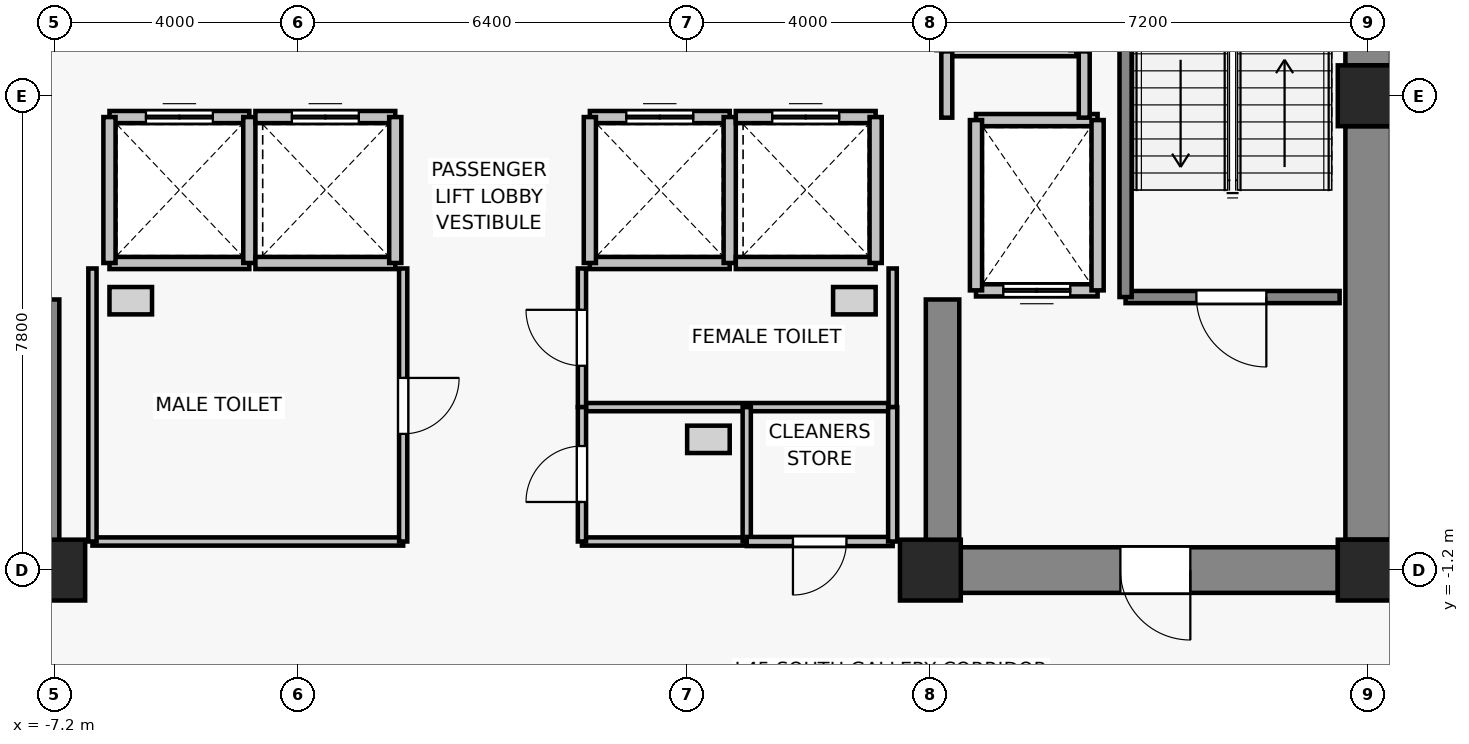
"""IFC4 building model, lengths in metres.
Left out: names, types, materials, properties, quantities, classifications, styles, units other than length and angle.
Written with IfcOpenShell. Run it as: python <this file> out.ifc"""

import sys

from ifc_helpers import new_model, si_unit, direction, frame, frame_2d, origin, origin_2d, place, context, subcontext, project, spatial, rectangle, extrude, source, transform, mapped, element, fill, save


model = new_model("IFC4")
c1 = context("Model", 3, precision=1e-05, world=origin(), true_north=direction((0.0, 1.0)))
c2 = subcontext(c1, "Body", "Model", "MODEL_VIEW")
j1 = project(units=[si_unit("LENGTHUNIT", "METRE"), si_unit("PLANEANGLEUNIT", "RADIAN")], contexts=[c1])
p1 = place(None, origin())
s1 = spatial("IfcSite", under=j1, at=p1, CompositionType="ELEMENT")
p2 = place(p1, origin())
s2 = spatial("IfcBuilding", under=s1, at=p2, CompositionType="ELEMENT")
p3 = place(p2, frame((0.0, 0.0, 162.7)))
s3 = spatial("IfcBuildingStorey", under=s2, at=p3, CompositionType="ELEMENT", Elevation=162.7)
for number, where, z_axis, x_axis in (
    (1, (-7.2, -1.2, 0.0), (0.0, 0.0, 1.0), (1.0, 0.0, 0.0)),
    (2, (7.2, -1.2, 0.0), (0.0, 0.0, 1.0), (1.0, 0.0, 0.0)),
    (3, (14.4, -1.2, 0.0), (0.0, 0.0, 1.0), (1.0, 0.0, 0.0)),
    (4, (14.4, 6.6, 0.0), (0.0, 0.0, 1.0), (1.0, 0.0, 0.0)),
):
    element("IfcColumn", number, at=place(p3, frame(where, z_axis=z_axis, x_axis=x_axis)), inside=s3, PredefinedType="COLUMN", context=c2, shape_type="SweptSolid", body=[
        extrude(rectangle(XDim=1.0, YDim=1.0, at=origin_2d()), origin(), (0.0, 0.0, 1.0), 3.3),
    ])
p4 = place(p3, frame((14.4, -0.7, 0.0), z_axis=(0.0, 0.0, 1.0), x_axis=(0.0, 1.0, 0.0)))
e5 = element("IfcWall", 5, at=p4, inside=s3, PredefinedType="SHEAR", context=c2, shape_type="SweptSolid", body=[
    extrude(rectangle(XDim=6.8, YDim=0.75, at=frame_2d((3.4, 0.0))), origin(), (0.0, 0.0, 1.0), 3.075),
])
p5 = place(p3, frame((14.4, 7.1, 0.0), z_axis=(0.0, 0.0, 1.0), x_axis=(0.0, 1.0, 0.0)))
e6 = element("IfcWall", 6, at=p5, inside=s3, PredefinedType="SHEAR", context=c2, shape_type="SweptSolid", body=[
    extrude(rectangle(XDim=5.9, YDim=0.75, at=frame_2d((2.95, 0.0))), origin(), (0.0, 0.0, 1.0), 3.075),
])
p6 = place(p3, frame((13.9, -1.2, 0.0), z_axis=(0.0, 0.0, 1.0), x_axis=(-1.0, 0.0, 0.0)))
e7 = element("IfcWall", 7, at=p6, inside=s3, PredefinedType="SHEAR", context=c2, shape_type="SweptSolid", body=[
    extrude(rectangle(XDim=6.2, YDim=0.75, at=frame_2d((3.1, 0.0))), origin(), (0.0, 0.0, 1.0), 3.075),
])
p7 = place(p6, frame((2.425, 0.0, 0.0)))
e8 = element("IfcOpeningElement", 8, at=p7, cuts=e7, PredefinedType="OPENING", context=c2, shape_type="SweptSolid", body=[
    extrude(rectangle(XDim=1.15, YDim=2.15, at=frame_2d((0.575, 1.075))), frame((0.0, 0.385, 0.0), z_axis=(0.0, -1.0, 0.0), x_axis=(1.0, 0.0, 0.0)), (0.0, 0.0, 1.0), 0.77),
])
for number, where, z_axis, x_axis in (
    (9, (-7.4, -0.825, 0.0), (0.0, 0.0, 1.0), (0.0, 1.0, 0.0)),
    (10, (7.4, -0.825, 0.0), (0.0, 0.0, 1.0), (0.0, 1.0, 0.0)),
):
    element("IfcWall", number, at=place(p3, frame(where, z_axis=z_axis, x_axis=x_axis)), inside=s3, PredefinedType="SHEAR", context=c2, shape_type="SweptSolid", body=[
        extrude(rectangle(XDim=4.075, YDim=0.55, at=frame_2d((2.038, 0.0))), origin(), (0.0, 0.0, 1.0), 3.075),
    ])
p8 = place(p3, frame((9.95, 3.4, 0.0), z_axis=(0.0, 0.0, 1.0), x_axis=(-1.0, 0.0, 0.0)))
e11 = element("IfcWall", 11, at=p8, inside=s3, PredefinedType="SOLIDWALL", context=c2, shape_type="SweptSolid", body=[
    extrude(rectangle(XDim=2.0, YDim=0.2, at=frame_2d((1.0, 0.0))), origin(), (0.0, 0.0, 1.0), 3.075),
])
p9 = place(p8, frame((0.45, 0.0, 0.0)))
e12 = element("IfcOpeningElement", 12, at=p9, cuts=e11, PredefinedType="OPENING", context=c2, shape_type="SweptSolid", body=[
    extrude(rectangle(XDim=1.1, YDim=2.2, at=frame_2d((0.55, 1.1))), frame((0.0, 0.11, 0.0), z_axis=(0.0, -1.0, 0.0), x_axis=(1.0, 0.0, 0.0)), (0.0, 0.0, 1.0), 0.22),
])
p10 = place(p3, frame((7.95, 6.2, 0.0), z_axis=(0.0, 0.0, 1.0), x_axis=(1.0, 0.0, 0.0)))
e13 = element("IfcWall", 13, at=p10, inside=s3, PredefinedType="SOLIDWALL", context=c2, shape_type="SweptSolid", body=[
    extrude(rectangle(XDim=2.0, YDim=0.2, at=frame_2d((1.0, 0.0))), origin(), (0.0, 0.0, 1.0), 3.075),
])
for number, where, z_axis, x_axis in (
    (14, (7.95, 3.4, 0.0), (0.0, 0.0, 1.0), (0.0, 1.0, 0.0)),
    (15, (9.95, 6.2, 0.0), (0.0, 0.0, 1.0), (0.0, -1.0, 0.0)),
):
    element("IfcWall", number, at=place(p3, frame(where, z_axis=z_axis, x_axis=x_axis)), inside=s3, PredefinedType="SOLIDWALL", context=c2, shape_type="SweptSolid", body=[
        extrude(rectangle(XDim=2.8, YDim=0.2, at=frame_2d((1.4, 0.0))), origin(), (0.0, 0.0, 1.0), 3.075),
    ])
p11 = place(p3, frame((-4.0, 3.85, 0.0), z_axis=(0.0, 0.0, 1.0), x_axis=(-1.0, 0.0, 0.0)))
e16 = element("IfcWall", 16, at=p11, inside=s3, PredefinedType="SOLIDWALL", context=c2, shape_type="SweptSolid", body=[
    extrude(rectangle(XDim=2.3, YDim=0.2, at=frame_2d((1.15, 0.0))), origin(), (0.0, 0.0, 1.0), 3.075),
])
p12 = place(p3, frame((-6.3, 6.25, 0.0), z_axis=(0.0, 0.0, 1.0), x_axis=(1.0, 0.0, 0.0)))
e17 = element("IfcWall", 17, at=p12, inside=s3, PredefinedType="SOLIDWALL", context=c2, shape_type="SweptSolid", body=[
    extrude(rectangle(XDim=2.3, YDim=0.2, at=frame_2d((1.15, 0.0))), origin(), (0.0, 0.0, 1.0), 3.075),
])
p13 = place(p12, frame((0.6, 0.0, 0.0)))
e18 = element("IfcOpeningElement", 18, at=p13, cuts=e17, PredefinedType="OPENING", context=c2, shape_type="SweptSolid", body=[
    extrude(rectangle(XDim=1.1, YDim=2.2, at=frame_2d((0.55, 1.1))), frame((0.0, 0.11, 0.0), z_axis=(0.0, -1.0, 0.0), x_axis=(1.0, 0.0, 0.0)), (0.0, 0.0, 1.0), 0.22),
])
for number, where, z_axis, x_axis in (
    (19, (-6.3, 3.85, 0.0), (0.0, 0.0, 1.0), (0.0, 1.0, 0.0)),
    (20, (-4.0, 6.25, 0.0), (0.0, 0.0, 1.0), (0.0, -1.0, 0.0)),
):
    element("IfcWall", number, at=place(p3, frame(where, z_axis=z_axis, x_axis=x_axis)), inside=s3, PredefinedType="SOLIDWALL", context=c2, shape_type="SweptSolid", body=[
        extrude(rectangle(XDim=2.4, YDim=0.2, at=frame_2d((1.2, 0.0))), origin(), (0.0, 0.0, 1.0), 3.075),
    ])
p14 = place(p3, frame((-1.6, 3.85, 0.0), z_axis=(0.0, 0.0, 1.0), x_axis=(-1.0, 0.0, 0.0)))
e21 = element("IfcWall", 21, at=p14, inside=s3, PredefinedType="SOLIDWALL", context=c2, shape_type="SweptSolid", body=[
    extrude(rectangle(XDim=2.3, YDim=0.2, at=frame_2d((1.15, 0.0))), origin(), (0.0, 0.0, 1.0), 3.075),
])
p15 = place(p3, frame((-3.9, 6.25, 0.0), z_axis=(0.0, 0.0, 1.0), x_axis=(1.0, 0.0, 0.0)))
e22 = element("IfcWall", 22, at=p15, inside=s3, PredefinedType="SOLIDWALL", context=c2, shape_type="SweptSolid", body=[
    extrude(rectangle(XDim=2.3, YDim=0.2, at=frame_2d((1.15, 0.0))), origin(), (0.0, 0.0, 1.0), 3.075),
])
p16 = place(p15, frame((0.6, 0.0, 0.0)))
e23 = element("IfcOpeningElement", 23, at=p16, cuts=e22, PredefinedType="OPENING", context=c2, shape_type="SweptSolid", body=[
    extrude(rectangle(XDim=1.1, YDim=2.2, at=frame_2d((0.55, 1.1))), frame((0.0, 0.11, 0.0), z_axis=(0.0, -1.0, 0.0), x_axis=(1.0, 0.0, 0.0)), (0.0, 0.0, 1.0), 0.22),
])
p17 = place(p3, frame((-1.6, 6.25, 0.0), z_axis=(0.0, 0.0, 1.0), x_axis=(0.0, -1.0, 0.0)))
e24 = element("IfcWall", 24, at=p17, inside=s3, PredefinedType="SOLIDWALL", context=c2, shape_type="SweptSolid", body=[
    extrude(rectangle(XDim=2.4, YDim=0.2, at=frame_2d((1.2, 0.0))), origin(), (0.0, 0.0, 1.0), 3.075),
])
p18 = place(p3, frame((3.9, 3.85, 0.0), z_axis=(0.0, 0.0, 1.0), x_axis=(-1.0, 0.0, 0.0)))
e25 = element("IfcWall", 25, at=p18, inside=s3, PredefinedType="SOLIDWALL", context=c2, shape_type="SweptSolid", body=[
    extrude(rectangle(XDim=2.3, YDim=0.2, at=frame_2d((1.15, 0.0))), origin(), (0.0, 0.0, 1.0), 3.075),
])
p19 = place(p3, frame((1.6, 6.25, 0.0), z_axis=(0.0, 0.0, 1.0), x_axis=(1.0, 0.0, 0.0)))
e26 = element("IfcWall", 26, at=p19, inside=s3, PredefinedType="SOLIDWALL", context=c2, shape_type="SweptSolid", body=[
    extrude(rectangle(XDim=2.3, YDim=0.2, at=frame_2d((1.15, 0.0))), origin(), (0.0, 0.0, 1.0), 3.075),
])
p20 = place(p19, frame((0.6, 0.0, 0.0)))
e27 = element("IfcOpeningElement", 27, at=p20, cuts=e26, PredefinedType="OPENING", context=c2, shape_type="SweptSolid", body=[
    extrude(rectangle(XDim=1.1, YDim=2.2, at=frame_2d((0.55, 1.1))), frame((0.0, 0.11, 0.0), z_axis=(0.0, -1.0, 0.0), x_axis=(1.0, 0.0, 0.0)), (0.0, 0.0, 1.0), 0.22),
])
for number, where, z_axis, x_axis in (
    (28, (1.6, 3.85, 0.0), (0.0, 0.0, 1.0), (0.0, 1.0, 0.0)),
    (29, (3.9, 6.25, 0.0), (0.0, 0.0, 1.0), (0.0, -1.0, 0.0)),
):
    element("IfcWall", number, at=place(p3, frame(where, z_axis=z_axis, x_axis=x_axis)), inside=s3, PredefinedType="SOLIDWALL", context=c2, shape_type="SweptSolid", body=[
        extrude(rectangle(XDim=2.4, YDim=0.2, at=frame_2d((1.2, 0.0))), origin(), (0.0, 0.0, 1.0), 3.075),
    ])
p21 = place(p3, frame((6.3, 3.85, 0.0), z_axis=(0.0, 0.0, 1.0), x_axis=(-1.0, 0.0, 0.0)))
e30 = element("IfcWall", 30, at=p21, inside=s3, PredefinedType="SOLIDWALL", context=c2, shape_type="SweptSolid", body=[
    extrude(rectangle(XDim=2.3, YDim=0.2, at=frame_2d((1.15, 0.0))), origin(), (0.0, 0.0, 1.0), 3.075),
])
p22 = place(p3, frame((4.0, 6.25, 0.0), z_axis=(0.0, 0.0, 1.0), x_axis=(1.0, 0.0, 0.0)))
e31 = element("IfcWall", 31, at=p22, inside=s3, PredefinedType="SOLIDWALL", context=c2, shape_type="SweptSolid", body=[
    extrude(rectangle(XDim=2.3, YDim=0.2, at=frame_2d((1.15, 0.0))), origin(), (0.0, 0.0, 1.0), 3.075),
])
p23 = place(p22, frame((0.6, 0.0, 0.0)))
e32 = element("IfcOpeningElement", 32, at=p23, cuts=e31, PredefinedType="OPENING", context=c2, shape_type="SweptSolid", body=[
    extrude(rectangle(XDim=1.1, YDim=2.2, at=frame_2d((0.55, 1.1))), frame((0.0, 0.11, 0.0), z_axis=(0.0, -1.0, 0.0), x_axis=(1.0, 0.0, 0.0)), (0.0, 0.0, 1.0), 0.22),
])
p24 = place(p3, frame((6.3, 6.25, 0.0), z_axis=(0.0, 0.0, 1.0), x_axis=(0.0, -1.0, 0.0)))
e33 = element("IfcWall", 33, at=p24, inside=s3, PredefinedType="SOLIDWALL", context=c2, shape_type="SweptSolid", body=[
    extrude(rectangle(XDim=2.4, YDim=0.2, at=frame_2d((1.2, 0.0))), origin(), (0.0, 0.0, 1.0), 3.075),
])
p25 = place(p3, frame((9.6, 7.35, 0.0), z_axis=(0.0, 0.0, 1.0), x_axis=(-1.0, 0.0, 0.0)))
e34 = element("IfcWall", 34, at=p25, inside=s3, PredefinedType="SOLIDWALL", context=c2, shape_type="SweptSolid", body=[
    extrude(rectangle(XDim=2.2, YDim=0.2, at=frame_2d((1.1, 0.0))), origin(), (0.0, 0.0, 1.0), 2.565),
])
p26 = place(p3, frame((13.93, 3.29, 0.0), z_axis=(0.0, 0.0, 1.0), x_axis=(-1.0, 0.0, 0.0)))
e35 = element("IfcWall", 35, at=p26, inside=s3, PredefinedType="SOLIDWALL", context=c2, shape_type="SweptSolid", body=[
    extrude(rectangle(XDim=3.52, YDim=0.2, at=frame_2d((1.76, 0.0))), origin(), (0.0, 0.0, 1.0), 3.075),
])
p27 = place(p26, frame((1.205, 0.0, 0.0)))
e36 = element("IfcOpeningElement", 36, at=p27, cuts=e35, PredefinedType="OPENING", context=c2, shape_type="SweptSolid", body=[
    extrude(rectangle(XDim=1.15, YDim=2.15, at=frame_2d((0.575, 1.075))), frame((0.0, 0.11, 0.0), z_axis=(0.0, -1.0, 0.0), x_axis=(1.0, 0.0, 0.0)), (0.0, 0.0, 1.0), 0.22),
])
p28 = place(p3, frame((10.41, 3.29, 0.0), z_axis=(0.0, 0.0, 1.0), x_axis=(0.0, 1.0, 0.0)))
e37 = element("IfcWall", 37, at=p28, inside=s3, PredefinedType="SOLIDWALL", context=c2, shape_type="SweptSolid", body=[
    extrude(rectangle(XDim=8.84, YDim=0.2, at=frame_2d((4.42, 0.0))), origin(), (0.0, 0.0, 1.0), 3.075),
])
p29 = place(p3, frame((7.47, 6.24, 0.0), z_axis=(0.0, 0.0, 1.0), x_axis=(0.0, 1.0, 0.0)))
e38 = element("IfcWall", 38, at=p29, inside=s3, PredefinedType="PARTITIONING", context=c2, shape_type="SweptSolid", body=[
    extrude(rectangle(XDim=1.09, YDim=0.18, at=frame_2d((0.545, 0.0))), origin(), (0.0, 0.0, 1.0), 2.565),
])
p30 = place(p3, frame((9.73, 7.33, 0.0), z_axis=(0.0, 0.0, 1.0), x_axis=(0.0, -1.0, 0.0)))
e39 = element("IfcWall", 39, at=p30, inside=s3, PredefinedType="PARTITIONING", context=c2, shape_type="SweptSolid", body=[
    extrude(rectangle(XDim=1.09, YDim=0.18, at=frame_2d((0.545, 0.0))), origin(), (0.0, 0.0, 1.0), 3.075),
])
p31 = place(p3, frame((-1.47, -0.73, 0.0), z_axis=(0.0, 0.0, 1.0), x_axis=(-1.0, 0.0, 0.0)))
e40 = element("IfcWall", 40, at=p31, inside=s3, PredefinedType="PARTITIONING", context=c2, shape_type="SweptSolid", body=[
    extrude(rectangle(XDim=5.11, YDim=0.135, at=frame_2d((2.555, 0.0))), origin(), (0.0, 0.0, 1.0), 3.075),
])
p32 = place(p3, frame((-6.58, -0.73, 0.0), z_axis=(0.0, 0.0, 1.0), x_axis=(0.0, 1.0, 0.0)))
e41 = element("IfcWall", 41, at=p32, inside=s3, PredefinedType="PARTITIONING", context=c2, shape_type="SweptSolid", body=[
    extrude(rectangle(XDim=4.49, YDim=0.135, at=frame_2d((2.245, 0.0))), origin(), (0.0, 0.0, 1.0), 3.075),
])
p33 = place(p3, frame((-1.47, 3.76, 0.0), z_axis=(0.0, 0.0, 1.0), x_axis=(0.0, -1.0, 0.0)))
e42 = element("IfcWall", 42, at=p33, inside=s3, PredefinedType="PARTITIONING", context=c2, shape_type="SweptSolid", body=[
    extrude(rectangle(XDim=4.49, YDim=0.135, at=frame_2d((2.245, 0.0))), origin(), (0.0, 0.0, 1.0), 3.075),
])
p34 = place(p33, frame((1.8, 0.0, 0.0)))
e43 = element("IfcOpeningElement", 43, at=p34, cuts=e42, PredefinedType="OPENING", context=c2, shape_type="SweptSolid", body=[
    extrude(rectangle(XDim=0.92, YDim=2.1, at=frame_2d((0.46, 1.05))), frame((0.0, 0.077, 0.0), z_axis=(0.0, -1.0, 0.0), x_axis=(1.0, 0.0, 0.0)), (0.0, 0.0, 1.0), 0.155),
])
p35 = place(p3, frame((6.58, 1.48, 0.0), z_axis=(0.0, 0.0, 1.0), x_axis=(-1.0, 0.0, 0.0)))
e44 = element("IfcWall", 44, at=p35, inside=s3, PredefinedType="PARTITIONING", context=c2, shape_type="SweptSolid", body=[
    extrude(rectangle(XDim=5.11, YDim=0.135, at=frame_2d((2.555, 0.0))), origin(), (0.0, 0.0, 1.0), 3.075),
])
p36 = place(p3, frame((1.47, 1.48, 0.0), z_axis=(0.0, 0.0, 1.0), x_axis=(0.0, 1.0, 0.0)))
e45 = element("IfcWall", 45, at=p36, inside=s3, PredefinedType="PARTITIONING", context=c2, shape_type="SweptSolid", body=[
    extrude(rectangle(XDim=2.28, YDim=0.135, at=frame_2d((1.14, 0.0))), origin(), (0.0, 0.0, 1.0), 3.075),
])
p37 = place(p36, frame((0.68, 0.0, 0.0)))
e46 = element("IfcOpeningElement", 46, at=p37, cuts=e45, PredefinedType="OPENING", context=c2, shape_type="SweptSolid", body=[
    extrude(rectangle(XDim=0.92, YDim=2.1, at=frame_2d((0.46, 1.05))), frame((0.0, 0.077, 0.0), z_axis=(0.0, -1.0, 0.0), x_axis=(1.0, 0.0, 0.0)), (0.0, 0.0, 1.0), 0.155),
])
p38 = place(p3, frame((6.58, 3.76, 0.0), z_axis=(0.0, 0.0, 1.0), x_axis=(0.0, -1.0, 0.0)))
e47 = element("IfcWall", 47, at=p38, inside=s3, PredefinedType="PARTITIONING", context=c2, shape_type="SweptSolid", body=[
    extrude(rectangle(XDim=2.28, YDim=0.135, at=frame_2d((1.14, 0.0))), origin(), (0.0, 0.0, 1.0), 3.075),
])
p39 = place(p3, frame((4.18, -0.73, 0.0), z_axis=(0.0, 0.0, 1.0), x_axis=(-1.0, 0.0, 0.0)))
e48 = element("IfcWall", 48, at=p39, inside=s3, PredefinedType="PARTITIONING", context=c2, shape_type="SweptSolid", body=[
    extrude(rectangle(XDim=2.71, YDim=0.135, at=frame_2d((1.355, 0.0))), origin(), (0.0, 0.0, 1.0), 3.075),
])
p40 = place(p3, frame((1.47, -0.73, 0.0), z_axis=(0.0, 0.0, 1.0), x_axis=(0.0, 1.0, 0.0)))
e49 = element("IfcWall", 49, at=p40, inside=s3, PredefinedType="PARTITIONING", context=c2, shape_type="SweptSolid", body=[
    extrude(rectangle(XDim=2.21, YDim=0.135, at=frame_2d((1.105, 0.0))), origin(), (0.0, 0.0, 1.0), 3.075),
])
p41 = place(p40, frame((0.65, 0.0, 0.0)))
e50 = element("IfcOpeningElement", 50, at=p41, cuts=e49, PredefinedType="OPENING", context=c2, shape_type="SweptSolid", body=[
    extrude(rectangle(XDim=0.92, YDim=2.1, at=frame_2d((0.46, 1.05))), frame((0.0, 0.077, 0.0), z_axis=(0.0, -1.0, 0.0), x_axis=(1.0, 0.0, 0.0)), (0.0, 0.0, 1.0), 0.155),
])
p42 = place(p3, frame((4.18, 1.48, 0.0), z_axis=(0.0, 0.0, 1.0), x_axis=(0.0, -1.0, 0.0)))
e51 = element("IfcWall", 51, at=p42, inside=s3, PredefinedType="PARTITIONING", context=c2, shape_type="SweptSolid", body=[
    extrude(rectangle(XDim=2.21, YDim=0.135, at=frame_2d((1.105, 0.0))), origin(), (0.0, 0.0, 1.0), 3.075),
])
p43 = place(p3, frame((6.58, -0.73, 0.0), z_axis=(0.0, 0.0, 1.0), x_axis=(-1.0, 0.0, 0.0)))
e52 = element("IfcWall", 52, at=p43, inside=s3, PredefinedType="PARTITIONING", context=c2, shape_type="SweptSolid", body=[
    extrude(rectangle(XDim=2.4, YDim=0.15, at=frame_2d((1.2, 0.0))), origin(), (0.0, 0.0, 1.0), 3.075),
])
p44 = place(p43, frame((0.76, 0.0, 0.0)))
e53 = element("IfcOpeningElement", 53, at=p44, cuts=e52, PredefinedType="OPENING", context=c2, shape_type="SweptSolid", body=[
    extrude(rectangle(XDim=0.88, YDim=2.1, at=frame_2d((0.44, 1.05))), frame((0.0, 0.085, 0.0), z_axis=(0.0, -1.0, 0.0), x_axis=(1.0, 0.0, 0.0)), (0.0, 0.0, 1.0), 0.17),
])
p45 = place(p3, frame((6.58, 1.48, 0.0), z_axis=(0.0, 0.0, 1.0), x_axis=(0.0, -1.0, 0.0)))
e54 = element("IfcWall", 54, at=p45, inside=s3, PredefinedType="PARTITIONING", context=c2, shape_type="SweptSolid", body=[
    extrude(rectangle(XDim=2.21, YDim=0.15, at=frame_2d((1.105, 0.0))), origin(), (0.0, 0.0, 1.0), 3.075),
])
m1 = source(origin(), c2, "Body", "SweptSolid", [
    extrude(rectangle(XDim=1.1, YDim=2.2, at=frame_2d((0.55, 1.1))), frame((0.0, 0.025, 0.0), z_axis=(0.0, -1.0, 0.0), x_axis=(1.0, 0.0, 0.0)), (0.0, 0.0, 1.0), 0.05),
])
p46 = place(p9, origin())
e55 = element("IfcDoor", 55, at=p46, inside=s3, OperationType="DOUBLE_DOOR_SLIDING", PredefinedType="DOOR", context=c2, shape_type="MappedRepresentation", body=[
    mapped(m1, transform((0.0, 0.0, 0.0), x_axis=(1.0, 0.0, 0.0), y_axis=(0.0, 1.0, 0.0), z_axis=(0.0, 0.0, 1.0), scale=1.0)),
])
fill(e12, e55)
p47 = place(p13, origin())
e56 = element("IfcDoor", 56, at=p47, inside=s3, OperationType="DOUBLE_DOOR_SLIDING", PredefinedType="DOOR", context=c2, shape_type="MappedRepresentation", body=[
    mapped(m1, transform((0.0, 0.0, 0.0), x_axis=(1.0, 0.0, 0.0), y_axis=(0.0, 1.0, 0.0), z_axis=(0.0, 0.0, 1.0), scale=1.0)),
])
fill(e18, e56)
p48 = place(p16, origin())
e57 = element("IfcDoor", 57, at=p48, inside=s3, OperationType="DOUBLE_DOOR_SLIDING", PredefinedType="DOOR", context=c2, shape_type="MappedRepresentation", body=[
    mapped(m1, transform((0.0, 0.0, 0.0), x_axis=(1.0, 0.0, 0.0), y_axis=(0.0, 1.0, 0.0), z_axis=(0.0, 0.0, 1.0), scale=1.0)),
])
fill(e23, e57)
p49 = place(p20, origin())
e58 = element("IfcDoor", 58, at=p49, inside=s3, OperationType="DOUBLE_DOOR_SLIDING", PredefinedType="DOOR", context=c2, shape_type="MappedRepresentation", body=[
    mapped(m1, transform((0.0, 0.0, 0.0), x_axis=(1.0, 0.0, 0.0), y_axis=(0.0, 1.0, 0.0), z_axis=(0.0, 0.0, 1.0), scale=1.0)),
])
fill(e27, e58)
p50 = place(p23, origin())
e59 = element("IfcDoor", 59, at=p50, inside=s3, OperationType="DOUBLE_DOOR_SLIDING", PredefinedType="DOOR", context=c2, shape_type="MappedRepresentation", body=[
    mapped(m1, transform((0.0, 0.0, 0.0), x_axis=(1.0, 0.0, 0.0), y_axis=(0.0, 1.0, 0.0), z_axis=(0.0, 0.0, 1.0), scale=1.0)),
])
fill(e32, e59)
m2 = source(origin(), c2, "Body", "SweptSolid", [
    extrude(rectangle(XDim=1.15, YDim=2.15, at=frame_2d((0.575, 1.075))), frame((0.0, 0.025, 0.0), z_axis=(0.0, -1.0, 0.0), x_axis=(1.0, 0.0, 0.0)), (0.0, 0.0, 1.0), 0.05),
])
p51 = place(p27, origin())
e60 = element("IfcDoor", 60, at=p51, inside=s3, OperationType="SINGLE_SWING_LEFT", PredefinedType="DOOR", context=c2, shape_type="MappedRepresentation", body=[
    mapped(m2, transform((0.0, 0.0, 0.0), x_axis=(1.0, 0.0, 0.0), y_axis=(0.0, 1.0, 0.0), z_axis=(0.0, 0.0, 1.0), scale=1.0)),
])
fill(e36, e60)
p52 = place(p7, origin())
e61 = element("IfcDoor", 61, at=p52, inside=s3, OperationType="SINGLE_SWING_LEFT", PredefinedType="DOOR", context=c2, shape_type="MappedRepresentation", body=[
    mapped(m2, transform((0.0, 0.0, 0.0), x_axis=(1.0, 0.0, 0.0), y_axis=(0.0, 1.0, 0.0), z_axis=(0.0, 0.0, 1.0), scale=1.0)),
])
fill(e8, e61)
m3 = source(origin(), c2, "Body", "SweptSolid", [
    extrude(rectangle(XDim=0.92, YDim=2.1, at=frame_2d((0.46, 1.05))), frame((0.0, 0.025, 0.0), z_axis=(0.0, -1.0, 0.0), x_axis=(1.0, 0.0, 0.0)), (0.0, 0.0, 1.0), 0.05),
])
p53 = place(p34, origin())
e62 = element("IfcDoor", 62, at=p53, inside=s3, OperationType="SINGLE_SWING_LEFT", PredefinedType="DOOR", context=c2, shape_type="MappedRepresentation", body=[
    mapped(m3, transform((0.0, 0.0, 0.0), x_axis=(1.0, 0.0, 0.0), y_axis=(0.0, 1.0, 0.0), z_axis=(0.0, 0.0, 1.0), scale=1.0)),
])
fill(e43, e62)
p54 = place(p37, origin())
e63 = element("IfcDoor", 63, at=p54, inside=s3, OperationType="SINGLE_SWING_RIGHT", PredefinedType="DOOR", context=c2, shape_type="MappedRepresentation", body=[
    mapped(m3, transform((0.0, 0.0, 0.0), x_axis=(1.0, 0.0, 0.0), y_axis=(0.0, 1.0, 0.0), z_axis=(0.0, 0.0, 1.0), scale=1.0)),
])
fill(e46, e63)
p55 = place(p41, origin())
e64 = element("IfcDoor", 64, at=p55, inside=s3, OperationType="SINGLE_SWING_LEFT", PredefinedType="DOOR", context=c2, shape_type="MappedRepresentation", body=[
    mapped(m3, transform((0.0, 0.0, 0.0), x_axis=(1.0, 0.0, 0.0), y_axis=(0.0, 1.0, 0.0), z_axis=(0.0, 0.0, 1.0), scale=1.0)),
])
fill(e50, e64)
m4 = source(origin(), c2, "Body", "SweptSolid", [
    extrude(rectangle(XDim=0.88, YDim=2.1, at=frame_2d((0.44, 1.05))), frame((0.0, 0.025, 0.0), z_axis=(0.0, -1.0, 0.0), x_axis=(1.0, 0.0, 0.0)), (0.0, 0.0, 1.0), 0.05),
])
p56 = place(p44, origin())
e65 = element("IfcDoor", 65, at=p56, inside=s3, OperationType="SINGLE_SWING_RIGHT", PredefinedType="DOOR", context=c2, shape_type="MappedRepresentation", body=[
    mapped(m4, transform((0.0, 0.0, 0.0), x_axis=(1.0, 0.0, 0.0), y_axis=(0.0, 1.0, 0.0), z_axis=(0.0, 0.0, 1.0), scale=1.0)),
])
fill(e53, e65)
save(model, sys.argv[1])
